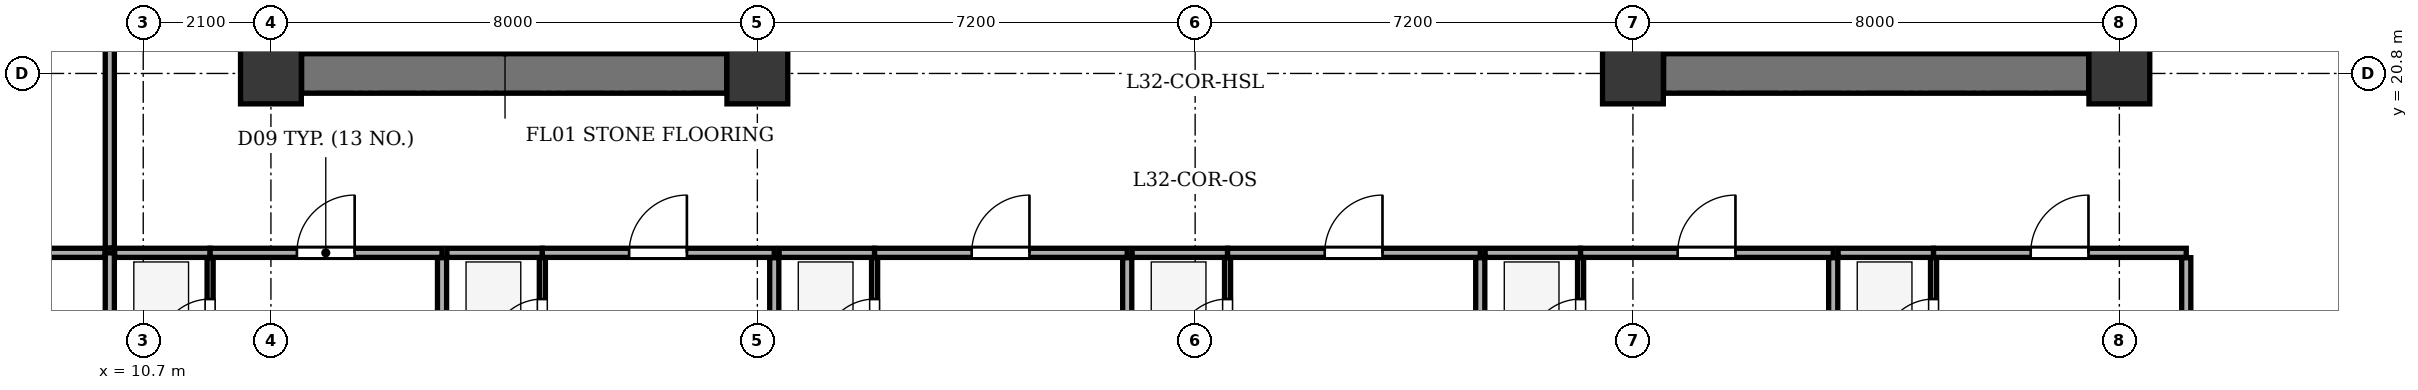
"""IFC4 building model, lengths in metres.
Left out: names, types, materials, properties, quantities, classifications, styles, units other than length and angle.
Written with IfcOpenShell. Run it as: python <this file> out.ifc"""

import sys

from ifc_helpers import new_model, si_unit, direction, frame, frame_2d, origin, origin_2d, place, context, subcontext, project, spatial, rectangle, extrude, element, fill, save


model = new_model("IFC4")
c1 = context("Model", 3, precision=1e-05, world=origin(), true_north=direction((0.0, 1.0)))
c2 = subcontext(c1, "Body", "Model", "MODEL_VIEW")
j1 = project(units=[si_unit("LENGTHUNIT", "METRE"), si_unit("PLANEANGLEUNIT", "RADIAN")], contexts=[c1])
p1 = place(None, origin())
s1 = spatial("IfcSite", under=j1, at=p1, CompositionType="ELEMENT")
p2 = place(p1, origin())
s2 = spatial("IfcBuilding", under=s1, at=p2, CompositionType="ELEMENT")
p3 = place(p2, frame((0.0, 0.0, 130.8)))
s3 = spatial("IfcBuildingStorey", under=s2, at=p3, CompositionType="ELEMENT", Elevation=130.8)
for number, where, z_axis, x_axis in (
    (1, (12.8, 20.8, 0.0), (0.0, 0.0, 1.0), (1.0, 0.0, 0.0)),
    (2, (20.8, 20.8, 0.0), (0.0, 0.0, 1.0), (1.0, 0.0, 0.0)),
    (3, (35.2, 20.8, 0.0), (0.0, 0.0, 1.0), (1.0, 0.0, 0.0)),
    (4, (43.2, 20.8, 0.0), (0.0, 0.0, 1.0), (1.0, 0.0, 0.0)),
):
    element("IfcColumn", number, at=place(p3, frame(where, z_axis=z_axis, x_axis=x_axis)), inside=s3, PredefinedType="COLUMN", context=c2, shape_type="SweptSolid", body=[
        extrude(rectangle(XDim=1.0, YDim=1.0, at=origin_2d()), origin(), (0.0, 0.0, 1.0), 3.5),
    ])
p4 = place(p3, frame((13.305, 20.8, 0.0), z_axis=(0.0, 0.0, 1.0), x_axis=(1.0, 0.0, 0.0)))
e5 = element("IfcWall", 5, at=p4, inside=s3, PredefinedType="SHEAR", context=c2, shape_type="SweptSolid", body=[
    extrude(rectangle(XDim=6.99, YDim=0.65, at=frame_2d((3.495, 0.0))), origin(), (0.0, 0.0, 1.0), 3.2),
])
p5 = place(p3, frame((16.435, 21.135, 0.0), z_axis=(0.0, 0.0, 1.0), x_axis=(0.0, 1.0, 0.0)))
e6 = element("IfcWall", 6, at=p5, inside=s3, PredefinedType="SHEAR", context=c2, shape_type="SweptSolid", body=[
    extrude(rectangle(XDim=12.13, YDim=0.25, at=frame_2d((6.065, 0.0))), origin(), (0.0, 0.0, 1.0), 3.2),
])
p6 = place(p5, frame((0.515, 0.0, 0.0)))
e7 = element("IfcOpeningElement", 7, at=p6, cuts=e6, PredefinedType="OPENING", context=c2, shape_type="SweptSolid", body=[
    extrude(rectangle(XDim=1.2, YDim=2.15, at=frame_2d((0.6, 1.075))), frame((0.0, 0.135, 0.0), z_axis=(0.0, -1.0, 0.0), x_axis=(1.0, 0.0, 0.0)), (0.0, 0.0, 1.0), 0.27),
])
p7 = place(p5, frame((2.665, 0.0, 0.0)))
e8 = element("IfcOpeningElement", 8, at=p7, cuts=e6, PredefinedType="OPENING", context=c2, shape_type="SweptSolid", body=[
    extrude(rectangle(XDim=1.15, YDim=2.15, at=frame_2d((0.575, 1.075))), frame((0.0, 0.135, 0.0), z_axis=(0.0, -1.0, 0.0), x_axis=(1.0, 0.0, 0.0)), (0.0, 0.0, 1.0), 0.27),
])
p8 = place(p3, frame((35.705, 20.8, 0.0), z_axis=(0.0, 0.0, 1.0), x_axis=(1.0, 0.0, 0.0)))
e9 = element("IfcWall", 9, at=p8, inside=s3, PredefinedType="SHEAR", context=c2, shape_type="SweptSolid", body=[
    extrude(rectangle(XDim=6.99, YDim=0.65, at=frame_2d((3.495, 0.0))), origin(), (0.0, 0.0, 1.0), 3.2),
])
p9 = place(p3, frame((39.565, 21.135, 0.0), z_axis=(0.0, 0.0, 1.0), x_axis=(0.0, 1.0, 0.0)))
e10 = element("IfcWall", 10, at=p9, inside=s3, PredefinedType="SHEAR", context=c2, shape_type="SweptSolid", body=[
    extrude(rectangle(XDim=12.13, YDim=0.25, at=frame_2d((6.065, 0.0))), origin(), (0.0, 0.0, 1.0), 3.2),
])
p10 = place(p9, frame((0.515, 0.0, 0.0)))
e11 = element("IfcOpeningElement", 11, at=p10, cuts=e10, PredefinedType="OPENING", context=c2, shape_type="SweptSolid", body=[
    extrude(rectangle(XDim=1.2, YDim=2.15, at=frame_2d((0.6, 1.075))), frame((0.0, 0.135, 0.0), z_axis=(0.0, -1.0, 0.0), x_axis=(1.0, 0.0, 0.0)), (0.0, 0.0, 1.0), 0.27),
])
p11 = place(p9, frame((2.665, 0.0, 0.0)))
e12 = element("IfcOpeningElement", 12, at=p11, cuts=e10, PredefinedType="OPENING", context=c2, shape_type="SweptSolid", body=[
    extrude(rectangle(XDim=1.15, YDim=2.15, at=frame_2d((0.575, 1.075))), frame((0.0, 0.135, 0.0), z_axis=(0.0, -1.0, 0.0), x_axis=(1.0, 0.0, 0.0)), (0.0, 0.0, 1.0), 0.27),
])
p12 = place(p3, frame((10.15, 1.875, 0.0), z_axis=(0.0, 0.0, 1.0), x_axis=(0.0, 1.0, 0.0)))
e13 = element("IfcWall", 13, at=p12, inside=s3, PredefinedType="PARTITIONING", context=c2, shape_type="SweptSolid", body=[
    extrude(rectangle(XDim=15.975, YDim=0.15, at=frame_2d((7.988, 0.0))), origin(), (0.0, 0.0, 1.0), 3.2),
])
p13 = place(p3, frame((10.23, 17.85, 0.0), z_axis=(0.0, 0.0, 1.0), x_axis=(1.0, 0.0, 0.0)))
e14 = element("IfcWall", 14, at=p13, inside=s3, PredefinedType="PARTITIONING", context=c2, shape_type="SweptSolid", body=[
    extrude(rectangle(XDim=1.57, YDim=0.15, at=frame_2d((0.785, 0.0))), origin(), (0.0, 0.0, 1.0), 3.2),
])
p14 = place(p3, frame((11.8, 17.85, 0.0), z_axis=(0.0, 0.0, 1.0), x_axis=(1.0, 0.0, 0.0)))
e15 = element("IfcWall", 15, at=p14, inside=s3, PredefinedType="PARTITIONING", context=c2, shape_type="SweptSolid", body=[
    extrude(rectangle(XDim=3.814, YDim=0.15, at=frame_2d((1.907, 0.0))), origin(), (0.0, 0.0, 1.0), 3.2),
])
p15 = place(p14, frame((1.427, 0.0, 0.0)))
e16 = element("IfcOpeningElement", 16, at=p15, cuts=e15, PredefinedType="OPENING", context=c2, shape_type="SweptSolid", body=[
    extrude(rectangle(XDim=0.95, YDim=2.1, at=frame_2d((0.475, 1.05))), frame((0.0, 0.085, 0.0), z_axis=(0.0, -1.0, 0.0), x_axis=(1.0, 0.0, 0.0)), (0.0, 0.0, 1.0), 0.17),
])
p16 = place(p3, frame((11.8, 15.52, 0.0), z_axis=(0.0, 0.0, 1.0), x_axis=(0.0, 1.0, 0.0)))
e17 = element("IfcWall", 17, at=p16, inside=s3, PredefinedType="PARTITIONING", context=c2, shape_type="SweptSolid", body=[
    extrude(rectangle(XDim=2.25, YDim=0.1, at=frame_2d((1.125, 0.0))), origin(), (0.0, 0.0, 1.0), 3.2),
])
p17 = place(p16, frame((0.72, 0.0, 0.0)))
e18 = element("IfcOpeningElement", 18, at=p17, cuts=e17, PredefinedType="OPENING", context=c2, shape_type="SweptSolid", body=[
    extrude(rectangle(XDim=0.85, YDim=2.05, at=frame_2d((0.425, 1.025))), frame((0.0, 0.06, 0.0), z_axis=(0.0, -1.0, 0.0), x_axis=(1.0, 0.0, 0.0)), (0.0, 0.0, 1.0), 0.12),
])
p18 = place(p3, frame((15.614, 1.875, 0.0), z_axis=(0.0, 0.0, 1.0), x_axis=(0.0, 1.0, 0.0)))
e19 = element("IfcWall", 19, at=p18, inside=s3, PredefinedType="PARTITIONING", context=c2, shape_type="SweptSolid", body=[
    extrude(rectangle(XDim=15.895, YDim=0.15, at=frame_2d((7.948, 0.0))), origin(), (0.0, 0.0, 1.0), 3.2),
])
p19 = place(p3, frame((15.694, 17.85, 0.0), z_axis=(0.0, 0.0, 1.0), x_axis=(1.0, 0.0, 0.0)))
e20 = element("IfcWall", 20, at=p19, inside=s3, PredefinedType="PARTITIONING", context=c2, shape_type="SweptSolid", body=[
    extrude(rectangle(XDim=1.57, YDim=0.15, at=frame_2d((0.785, 0.0))), origin(), (0.0, 0.0, 1.0), 3.2),
])
p20 = place(p3, frame((17.264, 17.85, 0.0), z_axis=(0.0, 0.0, 1.0), x_axis=(1.0, 0.0, 0.0)))
e21 = element("IfcWall", 21, at=p20, inside=s3, PredefinedType="PARTITIONING", context=c2, shape_type="SweptSolid", body=[
    extrude(rectangle(XDim=3.814, YDim=0.15, at=frame_2d((1.907, 0.0))), origin(), (0.0, 0.0, 1.0), 3.2),
])
p21 = place(p20, frame((1.427, 0.0, 0.0)))
e22 = element("IfcOpeningElement", 22, at=p21, cuts=e21, PredefinedType="OPENING", context=c2, shape_type="SweptSolid", body=[
    extrude(rectangle(XDim=0.95, YDim=2.1, at=frame_2d((0.475, 1.05))), frame((0.0, 0.085, 0.0), z_axis=(0.0, -1.0, 0.0), x_axis=(1.0, 0.0, 0.0)), (0.0, 0.0, 1.0), 0.17),
])
p22 = place(p3, frame((17.264, 15.52, 0.0), z_axis=(0.0, 0.0, 1.0), x_axis=(0.0, 1.0, 0.0)))
e23 = element("IfcWall", 23, at=p22, inside=s3, PredefinedType="PARTITIONING", context=c2, shape_type="SweptSolid", body=[
    extrude(rectangle(XDim=2.25, YDim=0.1, at=frame_2d((1.125, 0.0))), origin(), (0.0, 0.0, 1.0), 3.2),
])
p23 = place(p22, frame((0.72, 0.0, 0.0)))
e24 = element("IfcOpeningElement", 24, at=p23, cuts=e23, PredefinedType="OPENING", context=c2, shape_type="SweptSolid", body=[
    extrude(rectangle(XDim=0.85, YDim=2.05, at=frame_2d((0.425, 1.025))), frame((0.0, 0.06, 0.0), z_axis=(0.0, -1.0, 0.0), x_axis=(1.0, 0.0, 0.0)), (0.0, 0.0, 1.0), 0.12),
])
p24 = place(p3, frame((21.078, 1.875, 0.0), z_axis=(0.0, 0.0, 1.0), x_axis=(0.0, 1.0, 0.0)))
e25 = element("IfcWall", 25, at=p24, inside=s3, PredefinedType="PARTITIONING", context=c2, shape_type="SweptSolid", body=[
    extrude(rectangle(XDim=15.895, YDim=0.15, at=frame_2d((7.948, 0.0))), origin(), (0.0, 0.0, 1.0), 2.535),
])
p25 = place(p3, frame((21.158, 17.85, 0.0), z_axis=(0.0, 0.0, 1.0), x_axis=(1.0, 0.0, 0.0)))
e26 = element("IfcWall", 26, at=p25, inside=s3, PredefinedType="PARTITIONING", context=c2, shape_type="SweptSolid", body=[
    extrude(rectangle(XDim=1.57, YDim=0.15, at=frame_2d((0.785, 0.0))), origin(), (0.0, 0.0, 1.0), 3.2),
])
p26 = place(p3, frame((22.728, 17.85, 0.0), z_axis=(0.0, 0.0, 1.0), x_axis=(1.0, 0.0, 0.0)))
e27 = element("IfcWall", 27, at=p26, inside=s3, PredefinedType="PARTITIONING", context=c2, shape_type="SweptSolid", body=[
    extrude(rectangle(XDim=4.155, YDim=0.15, at=frame_2d((2.078, 0.0))), origin(), (0.0, 0.0, 1.0), 3.2),
])
p27 = place(p26, frame((1.597, 0.0, 0.0)))
e28 = element("IfcOpeningElement", 28, at=p27, cuts=e27, PredefinedType="OPENING", context=c2, shape_type="SweptSolid", body=[
    extrude(rectangle(XDim=0.95, YDim=2.1, at=frame_2d((0.475, 1.05))), frame((0.0, 0.085, 0.0), z_axis=(0.0, -1.0, 0.0), x_axis=(1.0, 0.0, 0.0)), (0.0, 0.0, 1.0), 0.17),
])
p28 = place(p3, frame((22.728, 15.52, 0.0), z_axis=(0.0, 0.0, 1.0), x_axis=(0.0, 1.0, 0.0)))
e29 = element("IfcWall", 29, at=p28, inside=s3, PredefinedType="PARTITIONING", context=c2, shape_type="SweptSolid", body=[
    extrude(rectangle(XDim=2.25, YDim=0.1, at=frame_2d((1.125, 0.0))), origin(), (0.0, 0.0, 1.0), 3.2),
])
p29 = place(p28, frame((0.72, 0.0, 0.0)))
e30 = element("IfcOpeningElement", 30, at=p29, cuts=e29, PredefinedType="OPENING", context=c2, shape_type="SweptSolid", body=[
    extrude(rectangle(XDim=0.85, YDim=2.05, at=frame_2d((0.425, 1.025))), frame((0.0, 0.06, 0.0), z_axis=(0.0, -1.0, 0.0), x_axis=(1.0, 0.0, 0.0)), (0.0, 0.0, 1.0), 0.12),
])
p30 = place(p3, frame((26.883, 1.875, 0.0), z_axis=(0.0, 0.0, 1.0), x_axis=(0.0, 1.0, 0.0)))
e31 = element("IfcWall", 31, at=p30, inside=s3, PredefinedType="PARTITIONING", context=c2, shape_type="SweptSolid", body=[
    extrude(rectangle(XDim=15.895, YDim=0.15, at=frame_2d((7.948, 0.0))), origin(), (0.0, 0.0, 1.0), 3.2),
])
p31 = place(p3, frame((26.963, 17.85, 0.0), z_axis=(0.0, 0.0, 1.0), x_axis=(1.0, 0.0, 0.0)))
e32 = element("IfcWall", 32, at=p31, inside=s3, PredefinedType="PARTITIONING", context=c2, shape_type="SweptSolid", body=[
    extrude(rectangle(XDim=1.57, YDim=0.15, at=frame_2d((0.785, 0.0))), origin(), (0.0, 0.0, 1.0), 3.2),
])
p32 = place(p3, frame((28.533, 17.85, 0.0), z_axis=(0.0, 0.0, 1.0), x_axis=(1.0, 0.0, 0.0)))
e33 = element("IfcWall", 33, at=p32, inside=s3, PredefinedType="PARTITIONING", context=c2, shape_type="SweptSolid", body=[
    extrude(rectangle(XDim=4.156, YDim=0.15, at=frame_2d((2.078, 0.0))), origin(), (0.0, 0.0, 1.0), 3.2),
])
p33 = place(p32, frame((1.598, 0.0, 0.0)))
e34 = element("IfcOpeningElement", 34, at=p33, cuts=e33, PredefinedType="OPENING", context=c2, shape_type="SweptSolid", body=[
    extrude(rectangle(XDim=0.95, YDim=2.1, at=frame_2d((0.475, 1.05))), frame((0.0, 0.085, 0.0), z_axis=(0.0, -1.0, 0.0), x_axis=(1.0, 0.0, 0.0)), (0.0, 0.0, 1.0), 0.17),
])
p34 = place(p3, frame((28.533, 15.52, 0.0), z_axis=(0.0, 0.0, 1.0), x_axis=(0.0, 1.0, 0.0)))
e35 = element("IfcWall", 35, at=p34, inside=s3, PredefinedType="PARTITIONING", context=c2, shape_type="SweptSolid", body=[
    extrude(rectangle(XDim=2.25, YDim=0.1, at=frame_2d((1.125, 0.0))), origin(), (0.0, 0.0, 1.0), 3.2),
])
p35 = place(p34, frame((0.72, 0.0, 0.0)))
e36 = element("IfcOpeningElement", 36, at=p35, cuts=e35, PredefinedType="OPENING", context=c2, shape_type="SweptSolid", body=[
    extrude(rectangle(XDim=0.85, YDim=2.05, at=frame_2d((0.425, 1.025))), frame((0.0, 0.06, 0.0), z_axis=(0.0, -1.0, 0.0), x_axis=(1.0, 0.0, 0.0)), (0.0, 0.0, 1.0), 0.12),
])
p36 = place(p3, frame((32.689, 1.875, 0.0), z_axis=(0.0, 0.0, 1.0), x_axis=(0.0, 1.0, 0.0)))
e37 = element("IfcWall", 37, at=p36, inside=s3, PredefinedType="PARTITIONING", context=c2, shape_type="SweptSolid", body=[
    extrude(rectangle(XDim=15.895, YDim=0.15, at=frame_2d((7.948, 0.0))), origin(), (0.0, 0.0, 1.0), 3.2),
])
p37 = place(p3, frame((32.769, 17.85, 0.0), z_axis=(0.0, 0.0, 1.0), x_axis=(1.0, 0.0, 0.0)))
e38 = element("IfcWall", 38, at=p37, inside=s3, PredefinedType="PARTITIONING", context=c2, shape_type="SweptSolid", body=[
    extrude(rectangle(XDim=1.57, YDim=0.15, at=frame_2d((0.785, 0.0))), origin(), (0.0, 0.0, 1.0), 3.2),
])
p38 = place(p3, frame((34.339, 17.85, 0.0), z_axis=(0.0, 0.0, 1.0), x_axis=(1.0, 0.0, 0.0)))
e39 = element("IfcWall", 39, at=p38, inside=s3, PredefinedType="PARTITIONING", context=c2, shape_type="SweptSolid", body=[
    extrude(rectangle(XDim=4.155, YDim=0.15, at=frame_2d((2.077, 0.0))), origin(), (0.0, 0.0, 1.0), 3.2),
])
p39 = place(p38, frame((1.597, 0.0, 0.0)))
e40 = element("IfcOpeningElement", 40, at=p39, cuts=e39, PredefinedType="OPENING", context=c2, shape_type="SweptSolid", body=[
    extrude(rectangle(XDim=0.95, YDim=2.1, at=frame_2d((0.475, 1.05))), frame((0.0, 0.085, 0.0), z_axis=(0.0, -1.0, 0.0), x_axis=(1.0, 0.0, 0.0)), (0.0, 0.0, 1.0), 0.17),
])
p40 = place(p3, frame((34.339, 15.52, 0.0), z_axis=(0.0, 0.0, 1.0), x_axis=(0.0, 1.0, 0.0)))
e41 = element("IfcWall", 41, at=p40, inside=s3, PredefinedType="PARTITIONING", context=c2, shape_type="SweptSolid", body=[
    extrude(rectangle(XDim=2.25, YDim=0.1, at=frame_2d((1.125, 0.0))), origin(), (0.0, 0.0, 1.0), 3.2),
])
p41 = place(p40, frame((0.72, 0.0, 0.0)))
e42 = element("IfcOpeningElement", 42, at=p41, cuts=e41, PredefinedType="OPENING", context=c2, shape_type="SweptSolid", body=[
    extrude(rectangle(XDim=0.85, YDim=2.05, at=frame_2d((0.425, 1.025))), frame((0.0, 0.06, 0.0), z_axis=(0.0, -1.0, 0.0), x_axis=(1.0, 0.0, 0.0)), (0.0, 0.0, 1.0), 0.12),
])
p42 = place(p3, frame((38.494, 1.875, 0.0), z_axis=(0.0, 0.0, 1.0), x_axis=(0.0, 1.0, 0.0)))
e43 = element("IfcWall", 43, at=p42, inside=s3, PredefinedType="PARTITIONING", context=c2, shape_type="SweptSolid", body=[
    extrude(rectangle(XDim=15.895, YDim=0.15, at=frame_2d((7.948, 0.0))), origin(), (0.0, 0.0, 1.0), 3.2),
])
p43 = place(p3, frame((38.574, 17.85, 0.0), z_axis=(0.0, 0.0, 1.0), x_axis=(1.0, 0.0, 0.0)))
e44 = element("IfcWall", 44, at=p43, inside=s3, PredefinedType="PARTITIONING", context=c2, shape_type="SweptSolid", body=[
    extrude(rectangle(XDim=1.57, YDim=0.15, at=frame_2d((0.785, 0.0))), origin(), (0.0, 0.0, 1.0), 3.2),
])
p44 = place(p3, frame((40.144, 17.85, 0.0), z_axis=(0.0, 0.0, 1.0), x_axis=(1.0, 0.0, 0.0)))
e45 = element("IfcWall", 45, at=p44, inside=s3, PredefinedType="PARTITIONING", context=c2, shape_type="SweptSolid", body=[
    extrude(rectangle(XDim=4.156, YDim=0.15, at=frame_2d((2.078, 0.0))), origin(), (0.0, 0.0, 1.0), 3.2),
])
p45 = place(p44, frame((1.598, 0.0, 0.0)))
e46 = element("IfcOpeningElement", 46, at=p45, cuts=e45, PredefinedType="OPENING", context=c2, shape_type="SweptSolid", body=[
    extrude(rectangle(XDim=0.95, YDim=2.1, at=frame_2d((0.475, 1.05))), frame((0.0, 0.085, 0.0), z_axis=(0.0, -1.0, 0.0), x_axis=(1.0, 0.0, 0.0)), (0.0, 0.0, 1.0), 0.17),
])
p46 = place(p3, frame((40.144, 15.52, 0.0), z_axis=(0.0, 0.0, 1.0), x_axis=(0.0, 1.0, 0.0)))
e47 = element("IfcWall", 47, at=p46, inside=s3, PredefinedType="PARTITIONING", context=c2, shape_type="SweptSolid", body=[
    extrude(rectangle(XDim=2.25, YDim=0.1, at=frame_2d((1.125, 0.0))), origin(), (0.0, 0.0, 1.0), 3.2),
])
p47 = place(p46, frame((0.72, 0.0, 0.0)))
e48 = element("IfcOpeningElement", 48, at=p47, cuts=e47, PredefinedType="OPENING", context=c2, shape_type="SweptSolid", body=[
    extrude(rectangle(XDim=0.85, YDim=2.05, at=frame_2d((0.425, 1.025))), frame((0.0, 0.06, 0.0), z_axis=(0.0, -1.0, 0.0), x_axis=(1.0, 0.0, 0.0)), (0.0, 0.0, 1.0), 0.12),
])
p48 = place(p3, frame((44.3, 1.875, 0.0), z_axis=(0.0, 0.0, 1.0), x_axis=(0.0, 1.0, 0.0)))
e49 = element("IfcWall", 49, at=p48, inside=s3, PredefinedType="PARTITIONING", context=c2, shape_type="SweptSolid", body=[
    extrude(rectangle(XDim=15.895, YDim=0.15, at=frame_2d((7.948, 0.0))), origin(), (0.0, 0.0, 1.0), 3.2),
])
p49 = place(p3, frame((4.675, 17.85, 0.0), z_axis=(0.0, 0.0, 1.0), x_axis=(1.0, 0.0, 0.0)))
e50 = element("IfcWall", 50, at=p49, inside=s3, PredefinedType="PARTITIONING", context=c2, shape_type="SweptSolid", body=[
    extrude(rectangle(XDim=5.395, YDim=0.15, at=frame_2d((2.698, 0.0))), origin(), (0.0, 0.0, 1.0), 3.2),
])
p50 = place(p3, frame((10.15, 17.93, 0.0), z_axis=(0.0, 0.0, 1.0), x_axis=(0.0, 1.0, 0.0)))
e51 = element("IfcWall", 51, at=p50, inside=s3, PredefinedType="PARTITIONING", context=c2, shape_type="SweptSolid", body=[
    extrude(rectangle(XDim=9.27, YDim=0.15, at=frame_2d((4.635, 0.0))), origin(), (0.0, 0.0, 1.0), 3.2),
])
p51 = place(p50, frame((4.115, 0.0, 0.0)))
e52 = element("IfcOpeningElement", 52, at=p51, cuts=e51, PredefinedType="OPENING", context=c2, shape_type="SweptSolid", body=[
    extrude(rectangle(XDim=0.95, YDim=2.1, at=frame_2d((0.475, 1.05))), frame((0.0, 0.085, 0.0), z_axis=(0.0, -1.0, 0.0), x_axis=(1.0, 0.0, 0.0)), (0.0, 0.0, 1.0), 0.17),
])
p52 = place(p17, origin())
e53 = element("IfcDoor", 53, at=p52, inside=s3, OperationType="SINGLE_SWING_LEFT", PredefinedType="DOOR", context=c2, shape_type="SweptSolid", body=[
    extrude(rectangle(XDim=0.85, YDim=2.05, at=frame_2d((0.425, 1.025))), frame((0.0, 0.025, 0.0), z_axis=(0.0, -1.0, 0.0), x_axis=(1.0, 0.0, 0.0)), (0.0, 0.0, 1.0), 0.05),
])
fill(e18, e53)
p53 = place(p15, origin())
e54 = element("IfcDoor", 54, at=p53, inside=s3, OperationType="SINGLE_SWING_RIGHT", PredefinedType="DOOR", context=c2, shape_type="SweptSolid", body=[
    extrude(rectangle(XDim=0.95, YDim=2.1, at=frame_2d((0.475, 1.05))), frame((0.0, 0.025, 0.0), z_axis=(0.0, -1.0, 0.0), x_axis=(1.0, 0.0, 0.0)), (0.0, 0.0, 1.0), 0.05),
])
fill(e16, e54)
p54 = place(p23, origin())
e55 = element("IfcDoor", 55, at=p54, inside=s3, OperationType="SINGLE_SWING_LEFT", PredefinedType="DOOR", context=c2, shape_type="SweptSolid", body=[
    extrude(rectangle(XDim=0.85, YDim=2.05, at=frame_2d((0.425, 1.025))), frame((0.0, 0.025, 0.0), z_axis=(0.0, -1.0, 0.0), x_axis=(1.0, 0.0, 0.0)), (0.0, 0.0, 1.0), 0.05),
])
fill(e24, e55)
p55 = place(p21, origin())
e56 = element("IfcDoor", 56, at=p55, inside=s3, OperationType="SINGLE_SWING_RIGHT", PredefinedType="DOOR", context=c2, shape_type="SweptSolid", body=[
    extrude(rectangle(XDim=0.95, YDim=2.1, at=frame_2d((0.475, 1.05))), frame((0.0, 0.025, 0.0), z_axis=(0.0, -1.0, 0.0), x_axis=(1.0, 0.0, 0.0)), (0.0, 0.0, 1.0), 0.05),
])
fill(e22, e56)
p56 = place(p29, origin())
e57 = element("IfcDoor", 57, at=p56, inside=s3, OperationType="SINGLE_SWING_LEFT", PredefinedType="DOOR", context=c2, shape_type="SweptSolid", body=[
    extrude(rectangle(XDim=0.85, YDim=2.05, at=frame_2d((0.425, 1.025))), frame((0.0, 0.025, 0.0), z_axis=(0.0, -1.0, 0.0), x_axis=(1.0, 0.0, 0.0)), (0.0, 0.0, 1.0), 0.05),
])
fill(e30, e57)
p57 = place(p27, origin())
e58 = element("IfcDoor", 58, at=p57, inside=s3, OperationType="SINGLE_SWING_RIGHT", PredefinedType="DOOR", context=c2, shape_type="SweptSolid", body=[
    extrude(rectangle(XDim=0.95, YDim=2.1, at=frame_2d((0.475, 1.05))), frame((0.0, 0.025, 0.0), z_axis=(0.0, -1.0, 0.0), x_axis=(1.0, 0.0, 0.0)), (0.0, 0.0, 1.0), 0.05),
])
fill(e28, e58)
p58 = place(p35, origin())
e59 = element("IfcDoor", 59, at=p58, inside=s3, OperationType="SINGLE_SWING_LEFT", PredefinedType="DOOR", context=c2, shape_type="SweptSolid", body=[
    extrude(rectangle(XDim=0.85, YDim=2.05, at=frame_2d((0.425, 1.025))), frame((0.0, 0.025, 0.0), z_axis=(0.0, -1.0, 0.0), x_axis=(1.0, 0.0, 0.0)), (0.0, 0.0, 1.0), 0.05),
])
fill(e36, e59)
p59 = place(p33, origin())
e60 = element("IfcDoor", 60, at=p59, inside=s3, OperationType="SINGLE_SWING_RIGHT", PredefinedType="DOOR", context=c2, shape_type="SweptSolid", body=[
    extrude(rectangle(XDim=0.95, YDim=2.1, at=frame_2d((0.475, 1.05))), frame((0.0, 0.025, 0.0), z_axis=(0.0, -1.0, 0.0), x_axis=(1.0, 0.0, 0.0)), (0.0, 0.0, 1.0), 0.05),
])
fill(e34, e60)
p60 = place(p41, origin())
e61 = element("IfcDoor", 61, at=p60, inside=s3, OperationType="SINGLE_SWING_LEFT", PredefinedType="DOOR", context=c2, shape_type="SweptSolid", body=[
    extrude(rectangle(XDim=0.85, YDim=2.05, at=frame_2d((0.425, 1.025))), frame((0.0, 0.025, 0.0), z_axis=(0.0, -1.0, 0.0), x_axis=(1.0, 0.0, 0.0)), (0.0, 0.0, 1.0), 0.05),
])
fill(e42, e61)
p61 = place(p39, origin())
e62 = element("IfcDoor", 62, at=p61, inside=s3, OperationType="SINGLE_SWING_RIGHT", PredefinedType="DOOR", context=c2, shape_type="SweptSolid", body=[
    extrude(rectangle(XDim=0.95, YDim=2.1, at=frame_2d((0.475, 1.05))), frame((0.0, 0.025, 0.0), z_axis=(0.0, -1.0, 0.0), x_axis=(1.0, 0.0, 0.0)), (0.0, 0.0, 1.0), 0.05),
])
fill(e40, e62)
p62 = place(p47, origin())
e63 = element("IfcDoor", 63, at=p62, inside=s3, OperationType="SINGLE_SWING_LEFT", PredefinedType="DOOR", context=c2, shape_type="SweptSolid", body=[
    extrude(rectangle(XDim=0.85, YDim=2.05, at=frame_2d((0.425, 1.025))), frame((0.0, 0.025, 0.0), z_axis=(0.0, -1.0, 0.0), x_axis=(1.0, 0.0, 0.0)), (0.0, 0.0, 1.0), 0.05),
])
fill(e48, e63)
p63 = place(p45, origin())
e64 = element("IfcDoor", 64, at=p63, inside=s3, OperationType="SINGLE_SWING_RIGHT", PredefinedType="DOOR", context=c2, shape_type="SweptSolid", body=[
    extrude(rectangle(XDim=0.95, YDim=2.1, at=frame_2d((0.475, 1.05))), frame((0.0, 0.025, 0.0), z_axis=(0.0, -1.0, 0.0), x_axis=(1.0, 0.0, 0.0)), (0.0, 0.0, 1.0), 0.05),
])
fill(e46, e64)
save(model, sys.argv[1])
